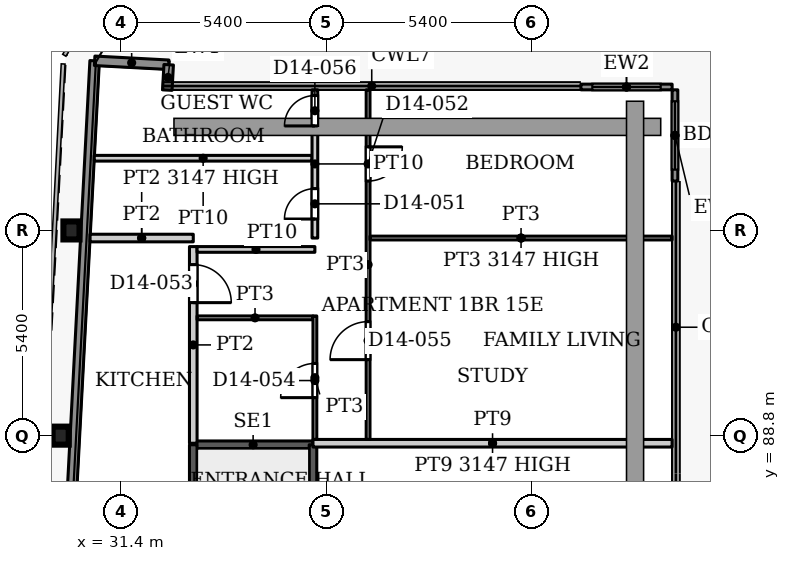
"""IFC4 building model, lengths in metres.
Left out: names, types, materials, properties, quantities, classifications, styles, units other than length and angle.
Written with IfcOpenShell. Run it as: python <this file> out.ifc"""

import sys

from ifc_helpers import new_model, si_unit, direction, frame, frame_2d, origin, origin_2d, place, context, subcontext, project, spatial, rectangle, i_section, extrude, source, transform, mapped, element, fill, save


model = new_model("IFC4")
c1 = context("Model", 3, precision=1e-05, world=origin(), true_north=direction((0.0, 1.0)))
c2 = subcontext(c1, "Body", "Model", "MODEL_VIEW")
j1 = project(units=[si_unit("LENGTHUNIT", "METRE"), si_unit("PLANEANGLEUNIT", "RADIAN")], contexts=[c1])
p1 = place(None, origin())
s1 = spatial("IfcSite", under=j1, at=p1, CompositionType="ELEMENT")
p2 = place(p1, origin())
s2 = spatial("IfcBuilding", under=s1, at=p2, CompositionType="ELEMENT")
p3 = place(p2, frame((0.0, 0.0, 65.6)))
s3 = spatial("IfcBuildingStorey", under=s2, at=p3, CompositionType="ELEMENT", Elevation=65.6)
for number, where, z_axis, x_axis in (
    (1, (29.811, 88.8, 0.0), (0.0, 0.0, 1.0), (1.0, 0.0, 0.0)),
    (2, (30.095, 94.2, 0.0), (0.0, 0.0, 1.0), (1.0, 0.0, 0.0)),
):
    element("IfcColumn", number, at=place(p3, frame(where, z_axis=z_axis, x_axis=x_axis)), inside=s3, PredefinedType="COLUMN", context=c2, shape_type="SweptSolid", body=[
        extrude(i_section(OverallWidth=0.424, OverallDepth=0.474, WebThickness=0.048, FlangeThickness=0.077, FilletRadius=0.014, at=origin_2d()), origin(), (0.0, 0.0, 1.0), 3.9),
    ])
p4 = place(p3, frame((27.195, 31.969, 0.0), z_axis=(0.0, 0.0, 1.0), x_axis=(0.052554995867, 0.998618031286, 0.0)))
e3 = element("IfcWall", 3, at=p4, inside=s3, PredefinedType="SOLIDWALL", context=c2, shape_type="SweptSolid", body=[
    extrude(rectangle(XDim=66.787, YDim=0.25, at=frame_2d((33.394, 0.0))), origin(), (0.0, 0.0, 1.0), 3.75),
])
p5 = place(p3, frame((30.705, 98.664, 0.0), z_axis=(0.0, 0.0, 1.0), x_axis=(0.998577785791, -0.053314216913, 0.0)))
e4 = element("IfcWall", 4, at=p5, inside=s3, PredefinedType="SOLIDWALL", context=c2, shape_type="SweptSolid", body=[
    extrude(rectangle(XDim=1.951, YDim=0.25, at=frame_2d((0.975, 0.0))), origin(), (0.0, 0.0, 1.0), 3.75),
])
p6 = place(p3, frame((32.653, 98.56, 0.0), z_axis=(0.0, 0.0, 1.0), x_axis=(-0.054093451632, -0.998535877418, 0.0)))
e5 = element("IfcWall", 5, at=p6, inside=s3, PredefinedType="SOLIDWALL", context=c2, shape_type="SweptSolid", body=[
    extrude(rectangle(XDim=0.668, YDim=0.25, at=frame_2d((0.334, 0.0))), origin(), (0.0, 0.0, 1.0), 3.75),
])
p7 = place(p3, frame((43.5, 97.975, 0.0), z_axis=(0.0, 0.0, 1.0), x_axis=(1.0, 0.0, 0.0)))
e6 = element("IfcWall", 6, at=p7, inside=s3, PredefinedType="SOLIDWALL", context=c2, shape_type="SweptSolid", body=[
    extrude(rectangle(XDim=2.4, YDim=0.15, at=frame_2d((1.2, 0.0))), origin(), (0.0, 0.0, 1.0), 3.75),
])
p8 = place(p7, frame((0.3, 0.0, 0.0)))
e7 = element("IfcOpeningElement", 7, at=p8, cuts=e6, PredefinedType="OPENING", context=c2, shape_type="SweptSolid", body=[
    extrude(rectangle(XDim=1.8, YDim=2.4, at=frame_2d((0.9, 1.2))), frame((0.0, 0.085, 0.0), z_axis=(0.0, -1.0, 0.0), x_axis=(1.0, 0.0, 0.0)), (0.0, 0.0, 1.0), 0.17),
])
p9 = place(p3, frame((45.975, 97.9, 0.0), z_axis=(0.0, 0.0, 1.0), x_axis=(0.0, -1.0, 0.0)))
e8 = element("IfcWall", 8, at=p9, inside=s3, PredefinedType="SOLIDWALL", context=c2, shape_type="SweptSolid", body=[
    extrude(rectangle(XDim=2.4, YDim=0.15, at=frame_2d((1.2, 0.0))), origin(), (0.0, 0.0, 1.0), 3.75),
])
p10 = place(p9, frame((0.3, 0.0, 0.0)))
e9 = element("IfcOpeningElement", 9, at=p10, cuts=e8, PredefinedType="OPENING", context=c2, shape_type="SweptSolid", body=[
    extrude(rectangle(XDim=1.8, YDim=2.4, at=frame_2d((0.9, 1.2))), frame((0.0, 0.085, 0.0), z_axis=(0.0, -1.0, 0.0), x_axis=(1.0, 0.0, 0.0)), (0.0, 0.0, 1.0), 0.17),
])
p11 = place(p3, frame((33.3, 88.56, 0.0), z_axis=(0.0, 0.0, 1.0), x_axis=(1.0, 0.0, 0.0)))
e10 = element("IfcWall", 10, at=p11, inside=s3, PredefinedType="SHEAR", context=c2, shape_type="SweptSolid", body=[
    extrude(rectangle(XDim=3.15, YDim=0.2, at=frame_2d((1.575, 0.0))), origin(), (0.0, 0.0, 1.0), 3.9),
])
p12 = place(p3, frame((33.3, 79.4, 0.0), z_axis=(0.0, 0.0, 1.0), x_axis=(0.0, 1.0, 0.0)))
e11 = element("IfcWall", 11, at=p12, inside=s3, PredefinedType="SHEAR", context=c2, shape_type="SweptSolid", body=[
    extrude(rectangle(XDim=9.16, YDim=0.2, at=frame_2d((4.58, 0.0))), origin(), (0.0, 0.0, 1.0), 3.9),
])
p13 = place(p12, frame((0.35, 0.0, 0.0)))
e12 = element("IfcOpeningElement", 12, at=p13, cuts=e11, PredefinedType="OPENING", context=c2, shape_type="SweptSolid", body=[
    extrude(rectangle(XDim=1.1, YDim=2.2, at=frame_2d((0.55, 1.1))), frame((0.0, 0.11, 0.0), z_axis=(0.0, -1.0, 0.0), x_axis=(1.0, 0.0, 0.0)), (0.0, 0.0, 1.0), 0.22),
])
p14 = place(p3, frame((36.45, 79.4, 0.0), z_axis=(0.0, 0.0, 1.0), x_axis=(0.0, 1.0, 0.0)))
e13 = element("IfcWall", 13, at=p14, inside=s3, PredefinedType="SHEAR", context=c2, shape_type="SweptSolid", body=[
    extrude(rectangle(XDim=9.16, YDim=0.2, at=frame_2d((4.58, 0.0))), origin(), (0.0, 0.0, 1.0), 3.9),
])
p15 = place(p3, frame((30.695, 96.1, 0.0), z_axis=(0.0, 0.0, 1.0), x_axis=(1.0, 0.0, 0.0)))
e14 = element("IfcWall", 14, at=p15, inside=s3, PredefinedType="PARTITIONING", context=c2, shape_type="SweptSolid", body=[
    extrude(rectangle(XDim=5.73, YDim=0.15, at=frame_2d((2.865, 0.0))), origin(), (0.0, 0.0, 1.0), 3.6),
])
p16 = place(p3, frame((30.585, 94.0, 0.0), z_axis=(0.0, 0.0, 1.0), x_axis=(1.0, 0.0, 0.0)))
e15 = element("IfcWall", 15, at=p16, inside=s3, PredefinedType="PARTITIONING", context=c2, shape_type="SweptSolid", body=[
    extrude(rectangle(XDim=2.715, YDim=0.2, at=frame_2d((1.358, 0.0))), origin(), (0.0, 0.0, 1.0), 3.147),
])
p17 = place(p3, frame((33.3, 88.6, 0.0), z_axis=(0.0, 0.0, 1.0), x_axis=(0.0, 1.0, 0.0)))
e16 = element("IfcWall", 16, at=p17, inside=s3, PredefinedType="PARTITIONING", context=c2, shape_type="SweptSolid", body=[
    extrude(rectangle(XDim=5.175, YDim=0.2, at=frame_2d((2.587, 0.0))), origin(), (0.0, 0.0, 1.0), 3.6),
])
p18 = place(p17, frame((3.7, 0.0, 0.0)))
e17 = element("IfcOpeningElement", 17, at=p18, cuts=e16, PredefinedType="OPENING", context=c2, shape_type="SweptSolid", body=[
    extrude(rectangle(XDim=1.0, YDim=2.1, at=frame_2d((0.5, 1.05))), frame((0.0, 0.11, 0.0), z_axis=(0.0, -1.0, 0.0), x_axis=(1.0, 0.0, 0.0)), (0.0, 0.0, 1.0), 0.22),
])
p19 = place(p3, frame((33.4, 91.9, 0.0), z_axis=(0.0, 0.0, 1.0), x_axis=(1.0, 0.0, 0.0)))
e18 = element("IfcWall", 18, at=p19, inside=s3, PredefinedType="PARTITIONING", context=c2, shape_type="SweptSolid", body=[
    extrude(rectangle(XDim=3.05, YDim=0.1, at=frame_2d((1.525, 0.0))), origin(), (0.0, 0.0, 1.0), 3.6),
])
p20 = place(p3, frame((33.4, 93.7, 0.0), z_axis=(0.0, 0.0, 1.0), x_axis=(1.0, 0.0, 0.0)))
e19 = element("IfcWall", 19, at=p20, inside=s3, PredefinedType="PARTITIONING", context=c2, shape_type="SweptSolid", body=[
    extrude(rectangle(XDim=3.1, YDim=0.15, at=frame_2d((1.55, 0.0))), origin(), (0.0, 0.0, 1.0), 3.6),
])
p21 = place(p3, frame((36.45, 88.6, 0.0), z_axis=(0.0, 0.0, 1.0), x_axis=(1.0, 0.0, 0.0)))
e20 = element("IfcWall", 20, at=p21, inside=s3, PredefinedType="PARTITIONING", context=c2, shape_type="SweptSolid", body=[
    extrude(rectangle(XDim=9.45, YDim=0.2, at=frame_2d((4.725, 0.0))), origin(), (0.0, 0.0, 1.0), 3.147),
])
p22 = place(p3, frame((36.5, 88.7, 0.0), z_axis=(0.0, 0.0, 1.0), x_axis=(0.0, 1.0, 0.0)))
e21 = element("IfcWall", 21, at=p22, inside=s3, PredefinedType="PARTITIONING", context=c2, shape_type="SweptSolid", body=[
    extrude(rectangle(XDim=3.25, YDim=0.1, at=frame_2d((1.625, 0.0))), origin(), (0.0, 0.0, 1.0), 3.6),
])
p23 = place(p22, frame((1.1, 0.0, 0.0)))
e22 = element("IfcOpeningElement", 22, at=p23, cuts=e21, PredefinedType="OPENING", context=c2, shape_type="SweptSolid", body=[
    extrude(rectangle(XDim=0.9, YDim=2.1, at=frame_2d((0.45, 1.05))), frame((0.0, 0.06, 0.0), z_axis=(0.0, -1.0, 0.0), x_axis=(1.0, 0.0, 0.0)), (0.0, 0.0, 1.0), 0.12),
])
p24 = place(p3, frame((36.5, 94.0, 0.0), z_axis=(0.0, 0.0, 1.0), x_axis=(0.0, 1.0, 0.0)))
e23 = element("IfcWall", 23, at=p24, inside=s3, PredefinedType="PARTITIONING", context=c2, shape_type="SweptSolid", body=[
    extrude(rectangle(XDim=3.9, YDim=0.15, at=frame_2d((1.95, 0.0))), origin(), (0.0, 0.0, 1.0), 3.6),
])
p25 = place(p24, frame((0.5, 0.0, 0.0)))
e24 = element("IfcOpeningElement", 24, at=p25, cuts=e23, PredefinedType="OPENING", context=c2, shape_type="SweptSolid", body=[
    extrude(rectangle(XDim=0.8, YDim=2.1, at=frame_2d((0.4, 1.05))), frame((0.0, 0.085, 0.0), z_axis=(0.0, -1.0, 0.0), x_axis=(1.0, 0.0, 0.0)), (0.0, 0.0, 1.0), 0.17),
])
p26 = place(p24, frame((2.95, 0.0, 0.0)))
e25 = element("IfcOpeningElement", 25, at=p26, cuts=e23, PredefinedType="OPENING", context=c2, shape_type="SweptSolid", body=[
    extrude(rectangle(XDim=0.8, YDim=2.1, at=frame_2d((0.4, 1.05))), frame((0.0, 0.085, 0.0), z_axis=(0.0, -1.0, 0.0), x_axis=(1.0, 0.0, 0.0)), (0.0, 0.0, 1.0), 0.17),
])
p27 = place(p3, frame((37.9, 88.7, 0.0), z_axis=(0.0, 0.0, 1.0), x_axis=(0.0, 1.0, 0.0)))
e26 = element("IfcWall", 26, at=p27, inside=s3, PredefinedType="PARTITIONING", context=c2, shape_type="SweptSolid", body=[
    extrude(rectangle(XDim=9.2, YDim=0.1, at=frame_2d((4.6, 0.0))), origin(), (0.0, 0.0, 1.0), 3.6),
])
p28 = place(p27, frame((6.8, 0.0, 0.0)))
e27 = element("IfcOpeningElement", 27, at=p28, cuts=e26, PredefinedType="OPENING", context=c2, shape_type="SweptSolid", body=[
    extrude(rectangle(XDim=0.9, YDim=2.1, at=frame_2d((0.45, 1.05))), frame((0.0, 0.06, 0.0), z_axis=(0.0, -1.0, 0.0), x_axis=(1.0, 0.0, 0.0)), (0.0, 0.0, 1.0), 0.12),
])
p29 = place(p27, frame((2.1, 0.0, 0.0)))
e28 = element("IfcOpeningElement", 28, at=p29, cuts=e26, PredefinedType="OPENING", context=c2, shape_type="SweptSolid", body=[
    extrude(rectangle(XDim=1.0, YDim=2.1, at=frame_2d((0.5, 1.05))), frame((0.0, 0.06, 0.0), z_axis=(0.0, -1.0, 0.0), x_axis=(1.0, 0.0, 0.0)), (0.0, 0.0, 1.0), 0.12),
])
p30 = place(p3, frame((37.95, 94.0, 0.0), z_axis=(0.0, 0.0, 1.0), x_axis=(1.0, 0.0, 0.0)))
e29 = element("IfcWall", 29, at=p30, inside=s3, PredefinedType="PARTITIONING", context=c2, shape_type="SweptSolid", body=[
    extrude(rectangle(XDim=7.95, YDim=0.1, at=frame_2d((3.975, 0.0))), origin(), (0.0, 0.0, 1.0), 3.147),
])
m1 = source(origin(), c2, "Body", "SweptSolid", [
    extrude(rectangle(XDim=1.8, YDim=2.4, at=frame_2d((0.9, 1.2))), frame((0.0, 0.025, 0.0), z_axis=(0.0, -1.0, 0.0), x_axis=(1.0, 0.0, 0.0)), (0.0, 0.0, 1.0), 0.05),
])
p31 = place(p8, origin())
e30 = element("IfcDoor", 30, at=p31, inside=s3, OperationType="SLIDING_TO_LEFT", PredefinedType="DOOR", context=c2, shape_type="MappedRepresentation", body=[
    mapped(m1, transform((0.0, 0.0, 0.0), x_axis=(1.0, 0.0, 0.0), y_axis=(0.0, 1.0, 0.0), z_axis=(0.0, 0.0, 1.0), scale=1.0)),
])
fill(e7, e30)
p32 = place(p10, origin())
e31 = element("IfcDoor", 31, at=p32, inside=s3, OperationType="SLIDING_TO_LEFT", PredefinedType="DOOR", context=c2, shape_type="MappedRepresentation", body=[
    mapped(m1, transform((0.0, 0.0, 0.0), x_axis=(1.0, 0.0, 0.0), y_axis=(0.0, 1.0, 0.0), z_axis=(0.0, 0.0, 1.0), scale=1.0)),
])
fill(e9, e31)
m2 = source(origin(), c2, "Body", "SweptSolid", [
    extrude(rectangle(XDim=0.8, YDim=2.1, at=frame_2d((0.4, 1.05))), frame((0.0, 0.025, 0.0), z_axis=(0.0, -1.0, 0.0), x_axis=(1.0, 0.0, 0.0)), (0.0, 0.0, 1.0), 0.05),
])
p33 = place(p25, origin())
e32 = element("IfcDoor", 32, at=p33, inside=s3, OperationType="SINGLE_SWING_LEFT", PredefinedType="DOOR", context=c2, shape_type="MappedRepresentation", body=[
    mapped(m2, transform((0.0, 0.0, 0.0), x_axis=(1.0, 0.0, 0.0), y_axis=(0.0, 1.0, 0.0), z_axis=(0.0, 0.0, 1.0), scale=1.0)),
])
fill(e24, e32)
m3 = source(origin(), c2, "Body", "SweptSolid", [
    extrude(rectangle(XDim=0.9, YDim=2.1, at=frame_2d((0.45, 1.05))), frame((0.0, 0.025, 0.0), z_axis=(0.0, -1.0, 0.0), x_axis=(1.0, 0.0, 0.0)), (0.0, 0.0, 1.0), 0.05),
])
p34 = place(p28, origin())
e33 = element("IfcDoor", 33, at=p34, inside=s3, OperationType="SINGLE_SWING_RIGHT", PredefinedType="DOOR", context=c2, shape_type="MappedRepresentation", body=[
    mapped(m3, transform((0.0, 0.0, 0.0), x_axis=(1.0, 0.0, 0.0), y_axis=(0.0, 1.0, 0.0), z_axis=(0.0, 0.0, 1.0), scale=1.0)),
])
fill(e27, e33)
m4 = source(origin(), c2, "Body", "SweptSolid", [
    extrude(rectangle(XDim=1.0, YDim=2.1, at=frame_2d((0.5, 1.05))), frame((0.0, 0.025, 0.0), z_axis=(0.0, -1.0, 0.0), x_axis=(1.0, 0.0, 0.0)), (0.0, 0.0, 1.0), 0.05),
])
p35 = place(p18, origin())
e34 = element("IfcDoor", 34, at=p35, inside=s3, OperationType="SINGLE_SWING_RIGHT", PredefinedType="DOOR", context=c2, shape_type="MappedRepresentation", body=[
    mapped(m4, transform((0.0, 0.0, 0.0), x_axis=(1.0, 0.0, 0.0), y_axis=(0.0, 1.0, 0.0), z_axis=(0.0, 0.0, 1.0), scale=1.0)),
])
fill(e17, e34)
p36 = place(p23, origin())
e35 = element("IfcDoor", 35, at=p36, inside=s3, OperationType="SINGLE_SWING_LEFT", PredefinedType="DOOR", context=c2, shape_type="MappedRepresentation", body=[
    mapped(m3, transform((0.0, 0.0, 0.0), x_axis=(1.0, 0.0, 0.0), y_axis=(0.0, 1.0, 0.0), z_axis=(0.0, 0.0, 1.0), scale=1.0)),
])
fill(e22, e35)
m5 = source(origin(), c2, "Body", "SweptSolid", [
    extrude(rectangle(XDim=1.0, YDim=2.1, at=frame_2d((0.5, 1.05))), frame((0.0, 0.025, 0.0), z_axis=(0.0, -1.0, 0.0), x_axis=(1.0, 0.0, 0.0)), (0.0, 0.0, 1.0), 0.05),
])
p37 = place(p29, origin())
e36 = element("IfcDoor", 36, at=p37, inside=s3, OperationType="SINGLE_SWING_LEFT", PredefinedType="DOOR", context=c2, shape_type="MappedRepresentation", body=[
    mapped(m5, transform((0.0, 0.0, 0.0), x_axis=(1.0, 0.0, 0.0), y_axis=(0.0, 1.0, 0.0), z_axis=(0.0, 0.0, 1.0), scale=1.0)),
])
fill(e28, e36)
p38 = place(p26, origin())
e37 = element("IfcDoor", 37, at=p38, inside=s3, OperationType="SINGLE_SWING_LEFT", PredefinedType="DOOR", context=c2, shape_type="MappedRepresentation", body=[
    mapped(m2, transform((0.0, 0.0, 0.0), x_axis=(1.0, 0.0, 0.0), y_axis=(0.0, 1.0, 0.0), z_axis=(0.0, 0.0, 1.0), scale=1.0)),
])
fill(e25, e37)
save(model, sys.argv[1])
